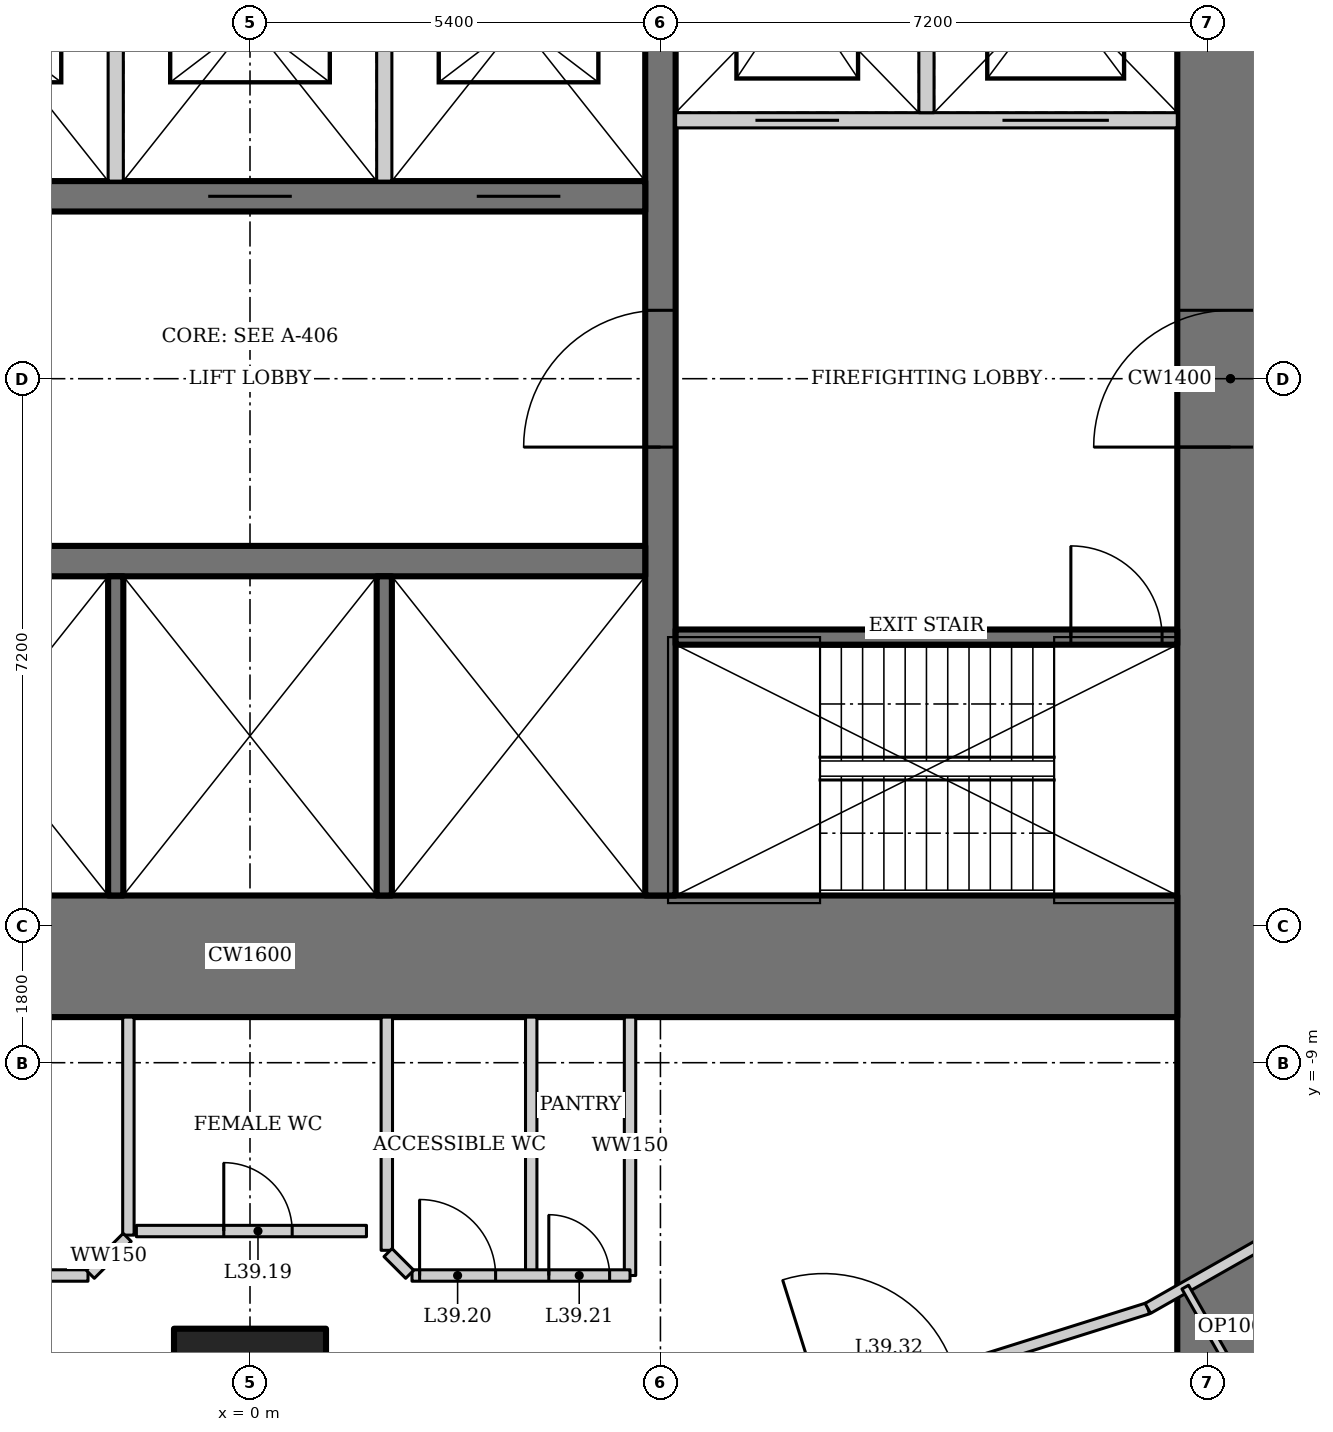
"""IFC4 building model, lengths in metres.
Left out: names, types, materials, properties, quantities, classifications, styles, units other than length and angle.
Written with IfcOpenShell. Run it as: python <this file> out.ifc"""

import sys

from ifc_helpers import new_model, si_unit, direction, frame, frame_2d, origin, origin_2d, place, context, subcontext, project, spatial, rectangle, hollow_rectangle, extrude, element, fill, save


model = new_model("IFC4")
c1 = context("Model", 3, precision=1e-05, world=origin(), true_north=direction((0.0, 1.0)))
c2 = subcontext(c1, "Body", "Model", "MODEL_VIEW")
j1 = project(units=[si_unit("LENGTHUNIT", "METRE"), si_unit("PLANEANGLEUNIT", "RADIAN")], contexts=[c1])
p1 = place(None, origin())
s1 = spatial("IfcSite", under=j1, at=p1, CompositionType="ELEMENT")
p2 = place(p1, origin())
s2 = spatial("IfcBuilding", under=s1, at=p2, CompositionType="ELEMENT")
p3 = place(p2, frame((0.0, 0.0, 167.8)))
s3 = spatial("IfcBuildingStorey", under=s2, at=p3, CompositionType="ELEMENT", Elevation=167.8)
p4 = place(p3, frame((0.0, -13.5, 0.0), z_axis=(0.0, 0.0, 1.0), x_axis=(1.0, 0.0, 0.0)))
e1 = element("IfcColumn", 1, at=p4, inside=s3, PredefinedType="COLUMN", context=c2, shape_type="SweptSolid", body=[
    extrude(hollow_rectangle(XDim=2.0, YDim=2.0, WallThickness=0.17, at=origin_2d()), origin(), (0.0, 0.0, 1.0), 4.2),
])
p5 = place(p3, frame((12.9, -13.0, 0.0), z_axis=(0.0, 0.0, 1.0), x_axis=(0.0, 1.0, 0.0)))
e2 = element("IfcWall", 2, at=p5, inside=s3, PredefinedType="SHEAR", context=c2, shape_type="SweptSolid", body=[
    extrude(rectangle(XDim=26.0, YDim=1.4, at=frame_2d((13.0, 0.0))), origin(), (0.0, 0.0, 1.0), 4.2),
])
p6 = place(p5, frame((12.1, 0.0, 0.0)))
e3 = element("IfcOpeningElement", 3, at=p6, cuts=e2, PredefinedType="OPENING", context=c2, shape_type="SweptSolid", body=[
    extrude(rectangle(XDim=1.8, YDim=2.1, at=frame_2d((0.9, 1.05))), frame((0.0, 0.71, 0.0), z_axis=(0.0, -1.0, 0.0), x_axis=(1.0, 0.0, 0.0)), (0.0, 0.0, 1.0), 1.42),
])
p7 = place(p3, frame((-12.2, -7.6, 0.0), z_axis=(0.0, 0.0, 1.0), x_axis=(1.0, 0.0, 0.0)))
e4 = element("IfcWall", 4, at=p7, inside=s3, PredefinedType="SHEAR", context=c2, shape_type="SweptSolid", body=[
    extrude(rectangle(XDim=24.4, YDim=1.6, at=frame_2d((12.2, 0.0))), origin(), (0.0, 0.0, 1.0), 4.2),
])
p8 = place(p3, frame((5.4, -6.8, 0.0), z_axis=(0.0, 0.0, 1.0), x_axis=(0.0, 1.0, 0.0)))
e5 = element("IfcWall", 5, at=p8, inside=s3, PredefinedType="SHEAR", context=c2, shape_type="SweptSolid", body=[
    extrude(rectangle(XDim=13.6, YDim=0.4, at=frame_2d((6.8, 0.0))), origin(), (0.0, 0.0, 1.0), 4.2),
])
p9 = place(p8, frame((5.9, 0.0, 0.0)))
e6 = element("IfcOpeningElement", 6, at=p9, cuts=e5, PredefinedType="OPENING", context=c2, shape_type="SweptSolid", body=[
    extrude(rectangle(XDim=1.8, YDim=2.1, at=frame_2d((0.9, 1.05))), frame((0.0, 0.21, 0.0), z_axis=(0.0, -1.0, 0.0), x_axis=(1.0, 0.0, 0.0)), (0.0, 0.0, 1.0), 0.42),
])
p10 = place(p3, frame((-5.2, -2.4, 0.0), z_axis=(0.0, 0.0, 1.0), x_axis=(1.0, 0.0, 0.0)))
e7 = element("IfcWall", 7, at=p10, inside=s3, PredefinedType="SHEAR", context=c2, shape_type="SweptSolid", body=[
    extrude(rectangle(XDim=10.4, YDim=0.4, at=frame_2d((5.2, 0.0))), origin(), (0.0, 0.0, 1.0), 4.2),
])
for number, where, z_axis, x_axis in (
    (8, (-1.767, -2.6, 0.0), (0.0, 0.0, 1.0), (0.0, -1.0, 0.0)),
    (9, (1.767, -2.6, 0.0), (0.0, 0.0, 1.0), (0.0, -1.0, 0.0)),
):
    element("IfcWall", number, at=place(p3, frame(where, z_axis=z_axis, x_axis=x_axis)), inside=s3, PredefinedType="SOLIDWALL", context=c2, shape_type="SweptSolid", body=[
        extrude(rectangle(XDim=4.2, YDim=0.2, at=frame_2d((2.1, 0.0))), origin(), (0.0, 0.0, 1.0), 4.2),
    ])
p11 = place(p3, frame((5.2, 2.4, 0.0), z_axis=(0.0, 0.0, 1.0), x_axis=(-1.0, 0.0, 0.0)))
e10 = element("IfcWall", 10, at=p11, inside=s3, PredefinedType="SHEAR", context=c2, shape_type="SweptSolid", body=[
    extrude(rectangle(XDim=10.4, YDim=0.4, at=frame_2d((5.2, 0.0))), origin(), (0.0, 0.0, 1.0), 4.2),
])
p12 = place(p11, frame((8.183, 0.0, 0.0)))
e11 = element("IfcOpeningElement", 11, at=p12, cuts=e10, PredefinedType="OPENING", context=c2, shape_type="SweptSolid", body=[
    extrude(rectangle(XDim=1.1, YDim=2.2, at=frame_2d((0.55, 1.1))), frame((0.0, 0.21, 0.0), z_axis=(0.0, -1.0, 0.0), x_axis=(1.0, 0.0, 0.0)), (0.0, 0.0, 1.0), 0.42),
])
p13 = place(p11, frame((4.65, 0.0, 0.0)))
e12 = element("IfcOpeningElement", 12, at=p13, cuts=e10, PredefinedType="OPENING", context=c2, shape_type="SweptSolid", body=[
    extrude(rectangle(XDim=1.1, YDim=2.2, at=frame_2d((0.55, 1.1))), frame((0.0, 0.21, 0.0), z_axis=(0.0, -1.0, 0.0), x_axis=(1.0, 0.0, 0.0)), (0.0, 0.0, 1.0), 0.42),
])
p14 = place(p11, frame((1.117, 0.0, 0.0)))
e13 = element("IfcOpeningElement", 13, at=p14, cuts=e10, PredefinedType="OPENING", context=c2, shape_type="SweptSolid", body=[
    extrude(rectangle(XDim=1.1, YDim=2.2, at=frame_2d((0.55, 1.1))), frame((0.0, 0.21, 0.0), z_axis=(0.0, -1.0, 0.0), x_axis=(1.0, 0.0, 0.0)), (0.0, 0.0, 1.0), 0.42),
])
for number, where, z_axis, x_axis in (
    (14, (-1.767, 2.6, 0.0), (0.0, 0.0, 1.0), (0.0, 1.0, 0.0)),
    (15, (1.767, 2.6, 0.0), (0.0, 0.0, 1.0), (0.0, 1.0, 0.0)),
):
    element("IfcWall", number, at=place(p3, frame(where, z_axis=z_axis, x_axis=x_axis)), inside=s3, PredefinedType="SOLIDWALL", context=c2, shape_type="SweptSolid", body=[
        extrude(rectangle(XDim=4.2, YDim=0.2, at=frame_2d((2.1, 0.0))), origin(), (0.0, 0.0, 1.0), 4.2),
    ])
p15 = place(p3, frame((5.6, -3.4, 0.0), z_axis=(0.0, 0.0, 1.0), x_axis=(1.0, 0.0, 0.0)))
e16 = element("IfcWall", 16, at=p15, inside=s3, PredefinedType="SHEAR", context=c2, shape_type="SweptSolid", body=[
    extrude(rectangle(XDim=6.6, YDim=0.2, at=frame_2d((3.3, 0.0))), origin(), (0.0, 0.0, 1.0), 4.2),
])
p16 = place(p15, frame((5.2, 0.0, 0.0)))
e17 = element("IfcOpeningElement", 17, at=p16, cuts=e16, PredefinedType="OPENING", context=c2, shape_type="SweptSolid", body=[
    extrude(rectangle(XDim=1.2, YDim=2.1, at=frame_2d((0.6, 1.05))), frame((0.0, 0.11, 0.0), z_axis=(0.0, -1.0, 0.0), x_axis=(1.0, 0.0, 0.0)), (0.0, 0.0, 1.0), 0.22),
])
p17 = place(p3, frame((12.2, 3.4, 0.0), z_axis=(0.0, 0.0, 1.0), x_axis=(-1.0, 0.0, 0.0)))
e18 = element("IfcWall", 18, at=p17, inside=s3, PredefinedType="SOLIDWALL", context=c2, shape_type="SweptSolid", body=[
    extrude(rectangle(XDim=6.6, YDim=0.2, at=frame_2d((3.3, 0.0))), origin(), (0.0, 0.0, 1.0), 4.2),
])
p18 = place(p17, frame((4.45, 0.0, 0.0)))
e19 = element("IfcOpeningElement", 19, at=p18, cuts=e18, PredefinedType="OPENING", context=c2, shape_type="SweptSolid", body=[
    extrude(rectangle(XDim=1.1, YDim=2.2, at=frame_2d((0.55, 1.1))), frame((0.0, 0.11, 0.0), z_axis=(0.0, -1.0, 0.0), x_axis=(1.0, 0.0, 0.0)), (0.0, 0.0, 1.0), 0.22),
])
p19 = place(p17, frame((0.9, 0.0, 0.0)))
e20 = element("IfcOpeningElement", 20, at=p19, cuts=e18, PredefinedType="OPENING", context=c2, shape_type="SweptSolid", body=[
    extrude(rectangle(XDim=1.4, YDim=2.2, at=frame_2d((0.7, 1.1))), frame((0.0, 0.11, 0.0), z_axis=(0.0, -1.0, 0.0), x_axis=(1.0, 0.0, 0.0)), (0.0, 0.0, 1.0), 0.22),
])
p20 = place(p3, frame((8.9, 3.5, 0.0), z_axis=(0.0, 0.0, 1.0), x_axis=(0.0, 1.0, 0.0)))
e21 = element("IfcWall", 21, at=p20, inside=s3, PredefinedType="SOLIDWALL", context=c2, shape_type="SweptSolid", body=[
    extrude(rectangle(XDim=3.3, YDim=0.2, at=frame_2d((1.65, 0.0))), origin(), (0.0, 0.0, 1.0), 4.2),
])
p21 = place(p3, frame((7.004, -13.746, 0.0), z_axis=(0.0, 0.0, 1.0), x_axis=(0.953893934057, 0.300143903101, 0.0)))
e22 = element("IfcWall", 22, at=p21, inside=s3, PredefinedType="PARTITIONING", context=c2, shape_type="SweptSolid", body=[
    extrude(rectangle(XDim=5.042, YDim=0.15, at=frame_2d((2.521, 0.0))), origin(), (0.0, 0.0, 1.0), 4.05),
])
p22 = place(p21, frame((0.57, 0.0, 0.0)))
e23 = element("IfcOpeningElement", 23, at=p22, cuts=e22, PredefinedType="OPENING", context=c2, shape_type="SweptSolid", body=[
    extrude(rectangle(XDim=1.8, YDim=2.1, at=frame_2d((0.9, 1.05))), frame((0.0, 0.085, 0.0), z_axis=(0.0, -1.0, 0.0), x_axis=(1.0, 0.0, 0.0)), (0.0, 0.0, 1.0), 0.17),
])
p23 = place(p3, frame((11.813, -12.232, 0.0), z_axis=(0.0, 0.0, 1.0), x_axis=(0.869375991036, 0.494151177485, 0.0)))
e24 = element("IfcWall", 24, at=p23, inside=s3, PredefinedType="PARTITIONING", context=c2, shape_type="SweptSolid", body=[
    extrude(rectangle(XDim=5.532, YDim=0.15, at=frame_2d((2.766, 0.0))), origin(), (0.0, 0.0, 1.0), 4.05),
])
for number, where, z_axis, x_axis in (
    (25, (5.0, -8.4, 0.0), (0.0, 0.0, 1.0), (0.0, -1.0, 0.0)),
    (26, (3.7, -8.4, 0.0), (0.0, 0.0, 1.0), (0.0, -1.0, 0.0)),
):
    element("IfcWall", number, at=place(p3, frame(where, z_axis=z_axis, x_axis=x_axis)), inside=s3, PredefinedType="SOLIDWALL", context=c2, shape_type="SweptSolid", body=[
        extrude(rectangle(XDim=3.4, YDim=0.15, at=frame_2d((1.7, 0.0))), origin(), (0.0, 0.0, 1.0), 4.05),
    ])
p24 = place(p3, frame((12.9, -13.0, 0.0), z_axis=(0.0, 0.0, 1.0), x_axis=(-0.494173075358, 0.869363543974, 0.0)))
e27 = element("IfcWall", 27, at=p24, inside=s3, PredefinedType="PARTITIONING", context=c2, shape_type="SweptSolid", body=[
    extrude(rectangle(XDim=1.204, YDim=0.1, at=frame_2d((0.602, 0.0))), origin(), (0.0, 0.0, 1.0), 4.05),
])
p25 = place(p3, frame((-5.0, -11.8, 0.0), z_axis=(0.0, 0.0, 1.0), x_axis=(1.0, 0.0, 0.0)))
e28 = element("IfcWall", 28, at=p25, inside=s3, PredefinedType="SOLIDWALL", context=c2, shape_type="SweptSolid", body=[
    extrude(rectangle(XDim=2.869, YDim=0.15, at=frame_2d((1.434, 0.0))), origin(), (0.0, 0.0, 1.0), 4.05),
])
p26 = place(p25, frame((1.25, 0.0, 0.0)))
e29 = element("IfcOpeningElement", 29, at=p26, cuts=e28, PredefinedType="OPENING", context=c2, shape_type="SweptSolid", body=[
    extrude(rectangle(XDim=0.9, YDim=2.1, at=frame_2d((0.45, 1.05))), frame((0.0, 0.085, 0.0), z_axis=(0.0, -1.0, 0.0), x_axis=(1.0, 0.0, 0.0)), (0.0, 0.0, 1.0), 0.17),
])
p27 = place(p3, frame((2.131, -11.8, 0.0), z_axis=(0.0, 0.0, 1.0), x_axis=(1.0, 0.0, 0.0)))
e30 = element("IfcWall", 30, at=p27, inside=s3, PredefinedType="SOLIDWALL", context=c2, shape_type="SweptSolid", body=[
    extrude(rectangle(XDim=2.869, YDim=0.15, at=frame_2d((1.434, 0.0))), origin(), (0.0, 0.0, 1.0), 4.05),
])
p28 = place(p27, frame((0.1, 0.0, 0.0)))
e31 = element("IfcOpeningElement", 31, at=p28, cuts=e30, PredefinedType="OPENING", context=c2, shape_type="SweptSolid", body=[
    extrude(rectangle(XDim=1.0, YDim=2.1, at=frame_2d((0.5, 1.05))), frame((0.0, 0.085, 0.0), z_axis=(0.0, -1.0, 0.0), x_axis=(1.0, 0.0, 0.0)), (0.0, 0.0, 1.0), 0.17),
])
p29 = place(p27, frame((1.8, 0.0, 0.0)))
e32 = element("IfcOpeningElement", 32, at=p29, cuts=e30, PredefinedType="OPENING", context=c2, shape_type="SweptSolid", body=[
    extrude(rectangle(XDim=0.8, YDim=2.1, at=frame_2d((0.4, 1.05))), frame((0.0, 0.085, 0.0), z_axis=(0.0, -1.0, 0.0), x_axis=(1.0, 0.0, 0.0)), (0.0, 0.0, 1.0), 0.17),
])
p30 = place(p3, frame((-1.6, -8.4, 0.0), z_axis=(0.0, 0.0, 1.0), x_axis=(0.0, -1.0, 0.0)))
e33 = element("IfcWall", 33, at=p30, inside=s3, PredefinedType="SOLIDWALL", context=c2, shape_type="SweptSolid", body=[
    extrude(rectangle(XDim=2.869, YDim=0.15, at=frame_2d((1.434, 0.0))), origin(), (0.0, 0.0, 1.0), 4.05),
])
p31 = place(p3, frame((1.8, -8.4, 0.0), z_axis=(0.0, 0.0, 1.0), x_axis=(0.0, -1.0, 0.0)))
e34 = element("IfcWall", 34, at=p31, inside=s3, PredefinedType="SOLIDWALL", context=c2, shape_type="SweptSolid", body=[
    extrude(rectangle(XDim=3.069, YDim=0.15, at=frame_2d((1.534, 0.0))), origin(), (0.0, 0.0, 1.0), 4.05),
])
p32 = place(p3, frame((-2.101, -11.784, 0.0), z_axis=(0.0, 0.0, 1.0), x_axis=(0.706928959799, 0.707284557867, 0.0)))
e35 = element("IfcWall", 35, at=p32, inside=s3, PredefinedType="SOLIDWALL", context=c2, shape_type="SweptSolid", body=[
    extrude(rectangle(XDim=0.687, YDim=0.15, at=frame_2d((0.343, 0.0))), origin(), (0.0, 0.0, 1.0), 4.05),
])
p33 = place(p3, frame((-1.495, -11.215, 0.0), z_axis=(0.0, 0.0, 1.0), x_axis=(1.0, 0.0, 0.0)))
e36 = element("IfcWall", 36, at=p33, inside=s3, PredefinedType="SOLIDWALL", context=c2, shape_type="SweptSolid", body=[
    extrude(rectangle(XDim=3.027, YDim=0.15, at=frame_2d((1.514, 0.0))), origin(), (0.0, 0.0, 1.0), 4.05),
])
p34 = place(p33, frame((1.15, 0.0, 0.0)))
e37 = element("IfcOpeningElement", 37, at=p34, cuts=e36, PredefinedType="OPENING", context=c2, shape_type="SweptSolid", body=[
    extrude(rectangle(XDim=0.9, YDim=2.1, at=frame_2d((0.45, 1.05))), frame((0.0, 0.085, 0.0), z_axis=(0.0, -1.0, 0.0), x_axis=(1.0, 0.0, 0.0)), (0.0, 0.0, 1.0), 0.17),
])
p35 = place(p3, frame((1.816, -11.499, 0.0), z_axis=(0.0, 0.0, 1.0), x_axis=(0.706804405012, -0.707409028113, 0.0)))
e38 = element("IfcWall", 38, at=p35, inside=s3, PredefinedType="SOLIDWALL", context=c2, shape_type="SweptSolid", body=[
    extrude(rectangle(XDim=0.404, YDim=0.15, at=frame_2d((0.202, 0.0))), origin(), (0.0, 0.0, 1.0), 4.05),
])
p36 = place(p9, origin())
e39 = element("IfcDoor", 39, at=p36, inside=s3, OperationType="DOUBLE_DOOR_DOUBLE_SWING", PredefinedType="DOOR", context=c2, shape_type="SweptSolid", body=[
    extrude(rectangle(XDim=1.8, YDim=2.1, at=frame_2d((0.9, 1.05))), frame((0.0, 0.025, 0.0), z_axis=(0.0, -1.0, 0.0), x_axis=(1.0, 0.0, 0.0)), (0.0, 0.0, 1.0), 0.05),
])
fill(e6, e39)
p37 = place(p16, origin())
e40 = element("IfcDoor", 40, at=p37, inside=s3, OperationType="SINGLE_SWING_RIGHT", PredefinedType="DOOR", context=c2, shape_type="SweptSolid", body=[
    extrude(rectangle(XDim=1.2, YDim=2.1, at=frame_2d((0.6, 1.05))), frame((0.0, 0.025, 0.0), z_axis=(0.0, -1.0, 0.0), x_axis=(1.0, 0.0, 0.0)), (0.0, 0.0, 1.0), 0.05),
])
fill(e17, e40)
p38 = place(p6, origin())
e41 = element("IfcDoor", 41, at=p38, inside=s3, OperationType="DOUBLE_DOOR_DOUBLE_SWING", PredefinedType="DOOR", context=c2, shape_type="SweptSolid", body=[
    extrude(rectangle(XDim=1.8, YDim=2.1, at=frame_2d((0.9, 1.05))), frame((0.0, 0.025, 0.0), z_axis=(0.0, -1.0, 0.0), x_axis=(1.0, 0.0, 0.0)), (0.0, 0.0, 1.0), 0.05),
])
fill(e3, e41)
p39 = place(p13, origin())
e42 = element("IfcDoor", 42, at=p39, inside=s3, OperationType="DOUBLE_DOOR_SLIDING", PredefinedType="DOOR", context=c2, shape_type="SweptSolid", body=[
    extrude(rectangle(XDim=1.1, YDim=2.2, at=frame_2d((0.55, 1.1))), frame((0.0, 0.025, 0.0), z_axis=(0.0, -1.0, 0.0), x_axis=(1.0, 0.0, 0.0)), (0.0, 0.0, 1.0), 0.05),
])
fill(e12, e42)
p40 = place(p14, origin())
e43 = element("IfcDoor", 43, at=p40, inside=s3, OperationType="DOUBLE_DOOR_SLIDING", PredefinedType="DOOR", context=c2, shape_type="SweptSolid", body=[
    extrude(rectangle(XDim=1.1, YDim=2.2, at=frame_2d((0.55, 1.1))), frame((0.0, 0.025, 0.0), z_axis=(0.0, -1.0, 0.0), x_axis=(1.0, 0.0, 0.0)), (0.0, 0.0, 1.0), 0.05),
])
fill(e13, e43)
p41 = place(p18, origin())
e44 = element("IfcDoor", 44, at=p41, inside=s3, OperationType="DOUBLE_DOOR_SLIDING", PredefinedType="DOOR", context=c2, shape_type="SweptSolid", body=[
    extrude(rectangle(XDim=1.1, YDim=2.2, at=frame_2d((0.55, 1.1))), frame((0.0, 0.025, 0.0), z_axis=(0.0, -1.0, 0.0), x_axis=(1.0, 0.0, 0.0)), (0.0, 0.0, 1.0), 0.05),
])
fill(e19, e44)
p42 = place(p19, origin())
e45 = element("IfcDoor", 45, at=p42, inside=s3, OperationType="DOUBLE_DOOR_SLIDING", PredefinedType="DOOR", context=c2, shape_type="SweptSolid", body=[
    extrude(rectangle(XDim=1.4, YDim=2.2, at=frame_2d((0.7, 1.1))), frame((0.0, 0.025, 0.0), z_axis=(0.0, -1.0, 0.0), x_axis=(1.0, 0.0, 0.0)), (0.0, 0.0, 1.0), 0.05),
])
fill(e20, e45)
p43 = place(p34, origin())
e46 = element("IfcDoor", 46, at=p43, inside=s3, OperationType="SINGLE_SWING_LEFT", PredefinedType="DOOR", context=c2, shape_type="SweptSolid", body=[
    extrude(rectangle(XDim=0.9, YDim=2.1, at=frame_2d((0.45, 1.05))), frame((0.0, 0.025, 0.0), z_axis=(0.0, -1.0, 0.0), x_axis=(1.0, 0.0, 0.0)), (0.0, 0.0, 1.0), 0.05),
])
fill(e37, e46)
p44 = place(p28, origin())
e47 = element("IfcDoor", 47, at=p44, inside=s3, OperationType="SINGLE_SWING_LEFT", PredefinedType="DOOR", context=c2, shape_type="SweptSolid", body=[
    extrude(rectangle(XDim=1.0, YDim=2.1, at=frame_2d((0.5, 1.05))), frame((0.0, 0.025, 0.0), z_axis=(0.0, -1.0, 0.0), x_axis=(1.0, 0.0, 0.0)), (0.0, 0.0, 1.0), 0.05),
])
fill(e31, e47)
p45 = place(p29, origin())
e48 = element("IfcDoor", 48, at=p45, inside=s3, OperationType="SINGLE_SWING_LEFT", PredefinedType="DOOR", context=c2, shape_type="SweptSolid", body=[
    extrude(rectangle(XDim=0.8, YDim=2.1, at=frame_2d((0.4, 1.05))), frame((0.0, 0.025, 0.0), z_axis=(0.0, -1.0, 0.0), x_axis=(1.0, 0.0, 0.0)), (0.0, 0.0, 1.0), 0.05),
])
fill(e32, e48)
save(model, sys.argv[1])
